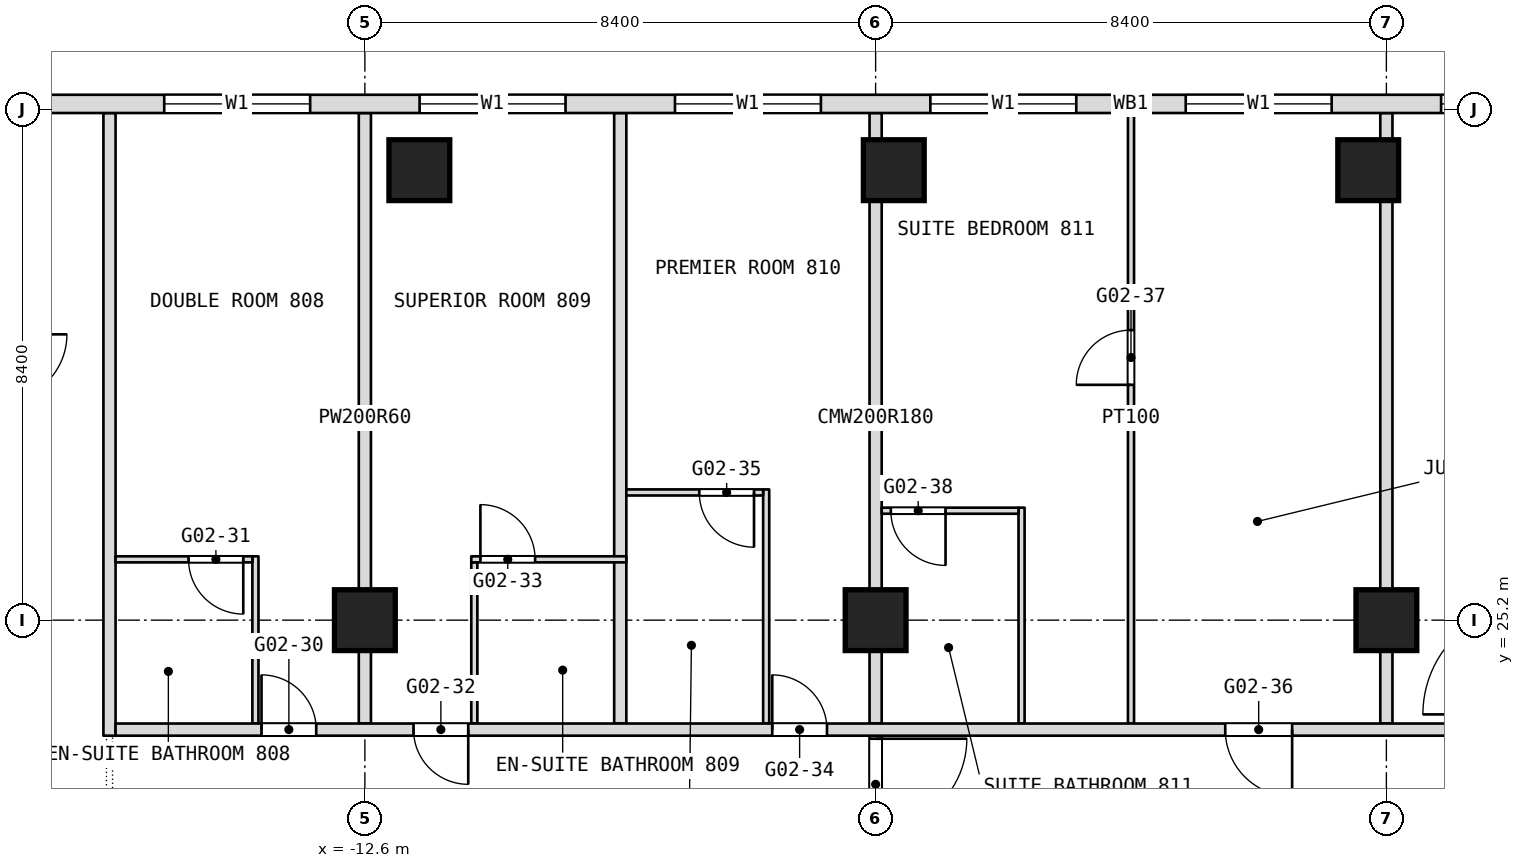
"""IFC4 building model, lengths in metres.
Left out: names, types, materials, properties, quantities, classifications, styles, units other than length and angle.
Written with IfcOpenShell. Run it as: python <this file> out.ifc"""

import sys

from ifc_helpers import new_model, si_unit, direction, frame, frame_2d, origin, origin_2d, place, context, subcontext, project, spatial, rectangle, extrude, element, fill, save


model = new_model("IFC4")
c1 = context("Model", 3, precision=1e-05, world=origin(), true_north=direction((0.0, 1.0)))
c2 = subcontext(c1, "Body", "Model", "MODEL_VIEW")
j1 = project(units=[si_unit("LENGTHUNIT", "METRE"), si_unit("PLANEANGLEUNIT", "RADIAN")], contexts=[c1])
p1 = place(None, origin())
s1 = spatial("IfcSite", under=j1, at=p1, CompositionType="ELEMENT")
p2 = place(p1, origin())
s2 = spatial("IfcBuilding", under=s1, at=p2, CompositionType="ELEMENT")
p3 = place(p2, frame((0.0, 0.0, 43.7)))
s3 = spatial("IfcBuildingStorey", under=s2, at=p3, CompositionType="ELEMENT", Elevation=43.7)
for number, where, z_axis, x_axis in (
    (1, (-12.6, 25.2, 0.0), (0.0, 0.0, 1.0), (1.0, 0.0, 0.0)),
    (2, (-4.2, 25.2, 0.0), (0.0, 0.0, 1.0), (1.0, 0.0, 0.0)),
    (3, (4.2, 25.2, 0.0), (0.0, 0.0, 1.0), (1.0, 0.0, 0.0)),
    (4, (-11.704, 32.6, 0.0), (0.0, 0.0, 1.0), (1.0, 0.0, 0.0)),
    (5, (-3.901, 32.6, 0.0), (0.0, 0.0, 1.0), (1.0, 0.0, 0.0)),
    (6, (3.901, 32.6, 0.0), (0.0, 0.0, 1.0), (1.0, 0.0, 0.0)),
):
    element("IfcColumn", number, at=place(p3, frame(where, z_axis=z_axis, x_axis=x_axis)), inside=s3, PredefinedType="COLUMN", context=c2, shape_type="SweptSolid", body=[
        extrude(rectangle(XDim=1.0, YDim=1.0, at=origin_2d()), origin(), (0.0, 0.0, 1.0), 3.6),
    ])
p4 = place(p3, frame((4.2, 23.5, 0.0), z_axis=(0.0, 0.0, 1.0), x_axis=(0.0, 1.0, 0.0)))
e7 = element("IfcWall", 7, at=p4, inside=s3, PredefinedType="PARTITIONING", context=c2, shape_type="SweptSolid", body=[
    extrude(rectangle(XDim=10.04, YDim=0.2, at=frame_2d((5.02, 0.0))), origin(), (0.0, 0.0, 1.0), 3.34),
])
p5 = place(p3, frame((0.0, 23.5, 0.0), z_axis=(0.0, 0.0, 1.0), x_axis=(0.0, 1.0, 0.0)))
e8 = element("IfcWall", 8, at=p5, inside=s3, PredefinedType="PARTITIONING", context=c2, shape_type="SweptSolid", body=[
    extrude(rectangle(XDim=10.04, YDim=0.1, at=frame_2d((5.02, 0.0))), origin(), (0.0, 0.0, 1.0), 3.34),
])
p6 = place(p5, frame((5.57, 0.0, 0.0)))
e9 = element("IfcOpeningElement", 9, at=p6, cuts=e8, PredefinedType="OPENING", context=c2, shape_type="SweptSolid", body=[
    extrude(rectangle(XDim=0.9, YDim=2.1, at=frame_2d((0.45, 1.05))), frame((0.0, 0.05, 0.0), z_axis=(0.0, -1.0, 0.0), x_axis=(1.0, 0.0, 0.0)), (0.0, 0.0, 1.0), 0.1),
])
p7 = place(p3, frame((-1.8, 23.5, 0.0), z_axis=(0.0, 0.0, 1.0), x_axis=(0.0, 1.0, 0.0)))
e10 = element("IfcWall", 10, at=p7, inside=s3, PredefinedType="PARTITIONING", context=c2, shape_type="SweptSolid", body=[
    extrude(rectangle(XDim=3.55, YDim=0.1, at=frame_2d((1.775, 0.0))), origin(), (0.0, 0.0, 1.0), 3.34),
])
p8 = place(p3, frame((-4.2, 16.8, 0.0), z_axis=(0.0, 0.0, 1.0), x_axis=(0.0, 1.0, 0.0)))
e11 = element("IfcWall", 11, at=p8, inside=s3, PredefinedType="PARTITIONING", context=c2, shape_type="SweptSolid", body=[
    extrude(rectangle(XDim=6.7, YDim=0.2, at=frame_2d((3.35, 0.0))), origin(), (0.0, 0.0, 1.0), 3.34),
])
p9 = place(p8, frame((0.15, 0.0, 0.0)))
e12 = element("IfcOpeningElement", 12, at=p9, cuts=e11, PredefinedType="OPENING", context=c2, shape_type="SweptSolid", body=[
    extrude(rectangle(XDim=1.5, YDim=2.1, at=frame_2d((0.75, 1.05))), frame((0.0, 0.1, 0.0), z_axis=(0.0, -1.0, 0.0), x_axis=(1.0, 0.0, 0.0)), (0.0, 0.0, 1.0), 0.2),
])
p10 = place(p8, frame((4.95, 0.0, 0.0)))
e13 = element("IfcOpeningElement", 13, at=p10, cuts=e11, PredefinedType="OPENING", context=c2, shape_type="SweptSolid", body=[
    extrude(rectangle(XDim=1.5, YDim=2.1, at=frame_2d((0.75, 1.05))), frame((0.0, 0.1, 0.0), z_axis=(0.0, -1.0, 0.0), x_axis=(1.0, 0.0, 0.0)), (0.0, 0.0, 1.0), 0.2),
])
p11 = place(p3, frame((-4.2, 23.5, 0.0), z_axis=(0.0, 0.0, 1.0), x_axis=(0.0, 1.0, 0.0)))
e14 = element("IfcWall", 14, at=p11, inside=s3, PredefinedType="PARTITIONING", context=c2, shape_type="SweptSolid", body=[
    extrude(rectangle(XDim=10.04, YDim=0.2, at=frame_2d((5.02, 0.0))), origin(), (0.0, 0.0, 1.0), 3.34),
])
p12 = place(p3, frame((-6.0, 23.5, 0.0), z_axis=(0.0, 0.0, 1.0), x_axis=(0.0, 1.0, 0.0)))
e15 = element("IfcWall", 15, at=p12, inside=s3, PredefinedType="PARTITIONING", context=c2, shape_type="SweptSolid", body=[
    extrude(rectangle(XDim=3.85, YDim=0.1, at=frame_2d((1.925, 0.0))), origin(), (0.0, 0.0, 1.0), 3.34),
])
p13 = place(p3, frame((-8.4, 23.5, 0.0), z_axis=(0.0, 0.0, 1.0), x_axis=(0.0, 1.0, 0.0)))
e16 = element("IfcWall", 16, at=p13, inside=s3, PredefinedType="PARTITIONING", context=c2, shape_type="SweptSolid", body=[
    extrude(rectangle(XDim=10.04, YDim=0.2, at=frame_2d((5.02, 0.0))), origin(), (0.0, 0.0, 1.0), 3.34),
])
p14 = place(p3, frame((-10.8, 23.5, 0.0), z_axis=(0.0, 0.0, 1.0), x_axis=(0.0, 1.0, 0.0)))
e17 = element("IfcWall", 17, at=p14, inside=s3, PredefinedType="PARTITIONING", context=c2, shape_type="SweptSolid", body=[
    extrude(rectangle(XDim=2.65, YDim=0.1, at=frame_2d((1.325, 0.0))), origin(), (0.0, 0.0, 1.0), 3.34),
])
p15 = place(p3, frame((-12.6, 23.5, 0.0), z_axis=(0.0, 0.0, 1.0), x_axis=(0.0, 1.0, 0.0)))
e18 = element("IfcWall", 18, at=p15, inside=s3, PredefinedType="PARTITIONING", context=c2, shape_type="SweptSolid", body=[
    extrude(rectangle(XDim=10.04, YDim=0.2, at=frame_2d((5.02, 0.0))), origin(), (0.0, 0.0, 1.0), 3.34),
])
p16 = place(p3, frame((-14.4, 23.5, 0.0), z_axis=(0.0, 0.0, 1.0), x_axis=(0.0, 1.0, 0.0)))
e19 = element("IfcWall", 19, at=p16, inside=s3, PredefinedType="PARTITIONING", context=c2, shape_type="SweptSolid", body=[
    extrude(rectangle(XDim=2.75, YDim=0.1, at=frame_2d((1.375, 0.0))), origin(), (0.0, 0.0, 1.0), 3.34),
])
p17 = place(p3, frame((-16.8, 23.3, 0.0), z_axis=(0.0, 0.0, 1.0), x_axis=(0.0, 1.0, 0.0)))
e20 = element("IfcWall", 20, at=p17, inside=s3, PredefinedType="PARTITIONING", context=c2, shape_type="SweptSolid", body=[
    extrude(rectangle(XDim=10.24, YDim=0.2, at=frame_2d((5.12, 0.0))), origin(), (0.0, 0.0, 1.0), 3.34),
])
p18 = place(p3, frame((-16.7, 23.4, 0.0), z_axis=(0.0, 0.0, 1.0), x_axis=(1.0, 0.0, 0.0)))
e21 = element("IfcWall", 21, at=p18, inside=s3, PredefinedType="PARTITIONING", context=c2, shape_type="SweptSolid", body=[
    extrude(rectangle(XDim=23.4, YDim=0.2, at=frame_2d((11.7, 0.0))), origin(), (0.0, 0.0, 1.0), 3.34),
])
p19 = place(p18, frame((2.4, 0.0, 0.0)))
e22 = element("IfcOpeningElement", 22, at=p19, cuts=e21, PredefinedType="OPENING", context=c2, shape_type="SweptSolid", body=[
    extrude(rectangle(XDim=0.9, YDim=2.1, at=frame_2d((0.45, 1.05))), frame((0.0, 0.1, 0.0), z_axis=(0.0, -1.0, 0.0), x_axis=(1.0, 0.0, 0.0)), (0.0, 0.0, 1.0), 0.2),
])
p20 = place(p18, frame((4.9, 0.0, 0.0)))
e23 = element("IfcOpeningElement", 23, at=p20, cuts=e21, PredefinedType="OPENING", context=c2, shape_type="SweptSolid", body=[
    extrude(rectangle(XDim=0.9, YDim=2.1, at=frame_2d((0.45, 1.05))), frame((0.0, 0.1, 0.0), z_axis=(0.0, -1.0, 0.0), x_axis=(1.0, 0.0, 0.0)), (0.0, 0.0, 1.0), 0.2),
])
p21 = place(p18, frame((10.8, 0.0, 0.0)))
e24 = element("IfcOpeningElement", 24, at=p21, cuts=e21, PredefinedType="OPENING", context=c2, shape_type="SweptSolid", body=[
    extrude(rectangle(XDim=0.9, YDim=2.1, at=frame_2d((0.45, 1.05))), frame((0.0, 0.1, 0.0), z_axis=(0.0, -1.0, 0.0), x_axis=(1.0, 0.0, 0.0)), (0.0, 0.0, 1.0), 0.2),
])
p22 = place(p18, frame((18.25, 0.0, 0.0)))
e25 = element("IfcOpeningElement", 25, at=p22, cuts=e21, PredefinedType="OPENING", context=c2, shape_type="SweptSolid", body=[
    extrude(rectangle(XDim=1.1, YDim=2.1, at=frame_2d((0.55, 1.05))), frame((0.0, 0.1, 0.0), z_axis=(0.0, -1.0, 0.0), x_axis=(1.0, 0.0, 0.0)), (0.0, 0.0, 1.0), 0.2),
])
p23 = place(p3, frame((-16.7, 26.2, 0.0), z_axis=(0.0, 0.0, 1.0), x_axis=(1.0, 0.0, 0.0)))
e26 = element("IfcWall", 26, at=p23, inside=s3, PredefinedType="PARTITIONING", context=c2, shape_type="SweptSolid", body=[
    extrude(rectangle(XDim=2.25, YDim=0.1, at=frame_2d((1.125, 0.0))), origin(), (0.0, 0.0, 1.0), 3.34),
])
p24 = place(p23, frame((1.2, 0.0, 0.0)))
e27 = element("IfcOpeningElement", 27, at=p24, cuts=e26, PredefinedType="OPENING", context=c2, shape_type="SweptSolid", body=[
    extrude(rectangle(XDim=0.9, YDim=2.1, at=frame_2d((0.45, 1.05))), frame((0.0, 0.05, 0.0), z_axis=(0.0, -1.0, 0.0), x_axis=(1.0, 0.0, 0.0)), (0.0, 0.0, 1.0), 0.1),
])
p25 = place(p3, frame((-10.85, 26.2, 0.0), z_axis=(0.0, 0.0, 1.0), x_axis=(1.0, 0.0, 0.0)))
e28 = element("IfcWall", 28, at=p25, inside=s3, PredefinedType="PARTITIONING", context=c2, shape_type="SweptSolid", body=[
    extrude(rectangle(XDim=2.55, YDim=0.1, at=frame_2d((1.275, 0.0))), origin(), (0.0, 0.0, 1.0), 3.34),
])
p26 = place(p25, frame((0.15, 0.0, 0.0)))
e29 = element("IfcOpeningElement", 29, at=p26, cuts=e28, PredefinedType="OPENING", context=c2, shape_type="SweptSolid", body=[
    extrude(rectangle(XDim=0.9, YDim=2.1, at=frame_2d((0.45, 1.05))), frame((0.0, 0.05, 0.0), z_axis=(0.0, -1.0, 0.0), x_axis=(1.0, 0.0, 0.0)), (0.0, 0.0, 1.0), 0.1),
])
p27 = place(p3, frame((-4.1, 27.0, 0.0), z_axis=(0.0, 0.0, 1.0), x_axis=(1.0, 0.0, 0.0)))
e30 = element("IfcWall", 30, at=p27, inside=s3, PredefinedType="PARTITIONING", context=c2, shape_type="SweptSolid", body=[
    extrude(rectangle(XDim=2.25, YDim=0.1, at=frame_2d((1.125, 0.0))), origin(), (0.0, 0.0, 1.0), 3.34),
])
p28 = place(p27, frame((0.15, 0.0, 0.0)))
e31 = element("IfcOpeningElement", 31, at=p28, cuts=e30, PredefinedType="OPENING", context=c2, shape_type="SweptSolid", body=[
    extrude(rectangle(XDim=0.9, YDim=2.1, at=frame_2d((0.45, 1.05))), frame((0.0, 0.05, 0.0), z_axis=(0.0, -1.0, 0.0), x_axis=(1.0, 0.0, 0.0)), (0.0, 0.0, 1.0), 0.1),
])
p29 = place(p3, frame((-8.3, 27.3, 0.0), z_axis=(0.0, 0.0, 1.0), x_axis=(1.0, 0.0, 0.0)))
e32 = element("IfcWall", 32, at=p29, inside=s3, PredefinedType="PARTITIONING", context=c2, shape_type="SweptSolid", body=[
    extrude(rectangle(XDim=2.25, YDim=0.1, at=frame_2d((1.125, 0.0))), origin(), (0.0, 0.0, 1.0), 3.34),
])
p30 = place(p29, frame((1.2, 0.0, 0.0)))
e33 = element("IfcOpeningElement", 33, at=p30, cuts=e32, PredefinedType="OPENING", context=c2, shape_type="SweptSolid", body=[
    extrude(rectangle(XDim=0.9, YDim=2.1, at=frame_2d((0.45, 1.05))), frame((0.0, 0.05, 0.0), z_axis=(0.0, -1.0, 0.0), x_axis=(1.0, 0.0, 0.0)), (0.0, 0.0, 1.0), 0.1),
])
p31 = place(p3, frame((23.406, 33.69, 0.0), z_axis=(0.0, 0.0, 1.0), x_axis=(-1.0, 0.0, 0.0)))
e34 = element("IfcWall", 34, at=p31, inside=s3, PredefinedType="NOTDEFINED", context=c2, shape_type="SweptSolid", body=[
    extrude(rectangle(XDim=46.812, YDim=0.3, at=frame_2d((23.406, 0.0))), origin(), (0.0, 0.0, 1.0), 3.6),
])
p32 = place(p31, frame((2.186, 0.0, 0.9)))
e35 = element("IfcOpeningElement", 35, at=p32, cuts=e34, PredefinedType="OPENING", context=c2, shape_type="SweptSolid", body=[
    extrude(rectangle(XDim=2.4, YDim=2.1, at=frame_2d((1.2, 1.05))), frame((0.0, 0.15, 0.0), z_axis=(0.0, -1.0, 0.0), x_axis=(1.0, 0.0, 0.0)), (0.0, 0.0, 1.0), 0.3),
])
p33 = place(p31, frame((7.506, 0.0, 0.9)))
e36 = element("IfcOpeningElement", 36, at=p33, cuts=e34, PredefinedType="OPENING", context=c2, shape_type="SweptSolid", body=[
    extrude(rectangle(XDim=2.4, YDim=2.1, at=frame_2d((1.2, 1.05))), frame((0.0, 0.15, 0.0), z_axis=(0.0, -1.0, 0.0), x_axis=(1.0, 0.0, 0.0)), (0.0, 0.0, 1.0), 0.3),
])
p34 = place(p31, frame((11.706, 0.0, 0.9)))
e37 = element("IfcOpeningElement", 37, at=p34, cuts=e34, PredefinedType="OPENING", context=c2, shape_type="SweptSolid", body=[
    extrude(rectangle(XDim=2.4, YDim=2.1, at=frame_2d((1.2, 1.05))), frame((0.0, 0.15, 0.0), z_axis=(0.0, -1.0, 0.0), x_axis=(1.0, 0.0, 0.0)), (0.0, 0.0, 1.0), 0.3),
])
p35 = place(p31, frame((15.906, 0.0, 0.9)))
e38 = element("IfcOpeningElement", 38, at=p35, cuts=e34, PredefinedType="OPENING", context=c2, shape_type="SweptSolid", body=[
    extrude(rectangle(XDim=2.4, YDim=2.1, at=frame_2d((1.2, 1.05))), frame((0.0, 0.15, 0.0), z_axis=(0.0, -1.0, 0.0), x_axis=(1.0, 0.0, 0.0)), (0.0, 0.0, 1.0), 0.3),
])
p36 = place(p31, frame((20.106, 0.0, 0.9)))
e39 = element("IfcOpeningElement", 39, at=p36, cuts=e34, PredefinedType="OPENING", context=c2, shape_type="SweptSolid", body=[
    extrude(rectangle(XDim=2.4, YDim=2.1, at=frame_2d((1.2, 1.05))), frame((0.0, 0.15, 0.0), z_axis=(0.0, -1.0, 0.0), x_axis=(1.0, 0.0, 0.0)), (0.0, 0.0, 1.0), 0.3),
])
p37 = place(p31, frame((24.306, 0.0, 0.9)))
e40 = element("IfcOpeningElement", 40, at=p37, cuts=e34, PredefinedType="OPENING", context=c2, shape_type="SweptSolid", body=[
    extrude(rectangle(XDim=2.4, YDim=2.1, at=frame_2d((1.2, 1.05))), frame((0.0, 0.15, 0.0), z_axis=(0.0, -1.0, 0.0), x_axis=(1.0, 0.0, 0.0)), (0.0, 0.0, 1.0), 0.3),
])
p38 = place(p31, frame((28.506, 0.0, 0.9)))
e41 = element("IfcOpeningElement", 41, at=p38, cuts=e34, PredefinedType="OPENING", context=c2, shape_type="SweptSolid", body=[
    extrude(rectangle(XDim=2.4, YDim=2.1, at=frame_2d((1.2, 1.05))), frame((0.0, 0.15, 0.0), z_axis=(0.0, -1.0, 0.0), x_axis=(1.0, 0.0, 0.0)), (0.0, 0.0, 1.0), 0.3),
])
p39 = place(p31, frame((32.706, 0.0, 0.9)))
e42 = element("IfcOpeningElement", 42, at=p39, cuts=e34, PredefinedType="OPENING", context=c2, shape_type="SweptSolid", body=[
    extrude(rectangle(XDim=2.4, YDim=2.1, at=frame_2d((1.2, 1.05))), frame((0.0, 0.15, 0.0), z_axis=(0.0, -1.0, 0.0), x_axis=(1.0, 0.0, 0.0)), (0.0, 0.0, 1.0), 0.3),
])
p40 = place(p31, frame((36.906, 0.0, 0.9)))
e43 = element("IfcOpeningElement", 43, at=p40, cuts=e34, PredefinedType="OPENING", context=c2, shape_type="SweptSolid", body=[
    extrude(rectangle(XDim=2.4, YDim=2.1, at=frame_2d((1.2, 1.05))), frame((0.0, 0.15, 0.0), z_axis=(0.0, -1.0, 0.0), x_axis=(1.0, 0.0, 0.0)), (0.0, 0.0, 1.0), 0.3),
])
p41 = place(p31, frame((42.226, 0.0, 0.9)))
e44 = element("IfcOpeningElement", 44, at=p41, cuts=e34, PredefinedType="OPENING", context=c2, shape_type="SweptSolid", body=[
    extrude(rectangle(XDim=2.4, YDim=2.1, at=frame_2d((1.2, 1.05))), frame((0.0, 0.15, 0.0), z_axis=(0.0, -1.0, 0.0), x_axis=(1.0, 0.0, 0.0)), (0.0, 0.0, 1.0), 0.3),
])
p42 = place(p6, origin())
e45 = element("IfcDoor", 45, at=p42, inside=s3, OperationType="SINGLE_SWING_LEFT", PredefinedType="DOOR", context=c2, shape_type="SweptSolid", body=[
    extrude(rectangle(XDim=0.9, YDim=2.1, at=frame_2d((0.45, 1.05))), frame((0.0, 0.025, 0.0), z_axis=(0.0, -1.0, 0.0), x_axis=(1.0, 0.0, 0.0)), (0.0, 0.0, 1.0), 0.05),
])
fill(e9, e45)
p43 = place(p19, origin())
e46 = element("IfcDoor", 46, at=p43, inside=s3, OperationType="SINGLE_SWING_LEFT", PredefinedType="DOOR", context=c2, shape_type="SweptSolid", body=[
    extrude(rectangle(XDim=0.9, YDim=2.1, at=frame_2d((0.45, 1.05))), frame((0.0, 0.025, 0.0), z_axis=(0.0, -1.0, 0.0), x_axis=(1.0, 0.0, 0.0)), (0.0, 0.0, 1.0), 0.05),
])
fill(e22, e46)
p44 = place(p20, origin())
e47 = element("IfcDoor", 47, at=p44, inside=s3, OperationType="SINGLE_SWING_RIGHT", PredefinedType="DOOR", context=c2, shape_type="SweptSolid", body=[
    extrude(rectangle(XDim=0.9, YDim=2.1, at=frame_2d((0.45, 1.05))), frame((0.0, 0.025, 0.0), z_axis=(0.0, -1.0, 0.0), x_axis=(1.0, 0.0, 0.0)), (0.0, 0.0, 1.0), 0.05),
])
fill(e23, e47)
p45 = place(p21, origin())
e48 = element("IfcDoor", 48, at=p45, inside=s3, OperationType="SINGLE_SWING_LEFT", PredefinedType="DOOR", context=c2, shape_type="SweptSolid", body=[
    extrude(rectangle(XDim=0.9, YDim=2.1, at=frame_2d((0.45, 1.05))), frame((0.0, 0.025, 0.0), z_axis=(0.0, -1.0, 0.0), x_axis=(1.0, 0.0, 0.0)), (0.0, 0.0, 1.0), 0.05),
])
fill(e24, e48)
p46 = place(p22, origin())
e49 = element("IfcDoor", 49, at=p46, inside=s3, OperationType="SINGLE_SWING_LEFT", PredefinedType="DOOR", context=c2, shape_type="SweptSolid", body=[
    extrude(rectangle(XDim=1.1, YDim=2.1, at=frame_2d((0.55, 1.05))), frame((0.0, 0.025, 0.0), z_axis=(0.0, -1.0, 0.0), x_axis=(1.0, 0.0, 0.0)), (0.0, 0.0, 1.0), 0.05),
])
fill(e25, e49)
p47 = place(p24, origin())
e50 = element("IfcDoor", 50, at=p47, inside=s3, OperationType="SINGLE_SWING_LEFT", PredefinedType="DOOR", context=c2, shape_type="SweptSolid", body=[
    extrude(rectangle(XDim=0.9, YDim=2.1, at=frame_2d((0.45, 1.05))), frame((0.0, 0.025, 0.0), z_axis=(0.0, -1.0, 0.0), x_axis=(1.0, 0.0, 0.0)), (0.0, 0.0, 1.0), 0.05),
])
fill(e27, e50)
p48 = place(p26, origin())
e51 = element("IfcDoor", 51, at=p48, inside=s3, OperationType="SINGLE_SWING_RIGHT", PredefinedType="DOOR", context=c2, shape_type="SweptSolid", body=[
    extrude(rectangle(XDim=0.9, YDim=2.1, at=frame_2d((0.45, 1.05))), frame((0.0, 0.025, 0.0), z_axis=(0.0, -1.0, 0.0), x_axis=(1.0, 0.0, 0.0)), (0.0, 0.0, 1.0), 0.05),
])
fill(e29, e51)
p49 = place(p28, origin())
e52 = element("IfcDoor", 52, at=p49, inside=s3, OperationType="SINGLE_SWING_RIGHT", PredefinedType="DOOR", context=c2, shape_type="SweptSolid", body=[
    extrude(rectangle(XDim=0.9, YDim=2.1, at=frame_2d((0.45, 1.05))), frame((0.0, 0.025, 0.0), z_axis=(0.0, -1.0, 0.0), x_axis=(1.0, 0.0, 0.0)), (0.0, 0.0, 1.0), 0.05),
])
fill(e31, e52)
p50 = place(p30, origin())
e53 = element("IfcDoor", 53, at=p50, inside=s3, OperationType="SINGLE_SWING_LEFT", PredefinedType="DOOR", context=c2, shape_type="SweptSolid", body=[
    extrude(rectangle(XDim=0.9, YDim=2.1, at=frame_2d((0.45, 1.05))), frame((0.0, 0.025, 0.0), z_axis=(0.0, -1.0, 0.0), x_axis=(1.0, 0.0, 0.0)), (0.0, 0.0, 1.0), 0.05),
])
fill(e33, e53)
p51 = place(p35, origin())
e54 = element("IfcWindow", 54, at=p51, inside=s3, PartitioningType="SINGLE_PANEL", PredefinedType="WINDOW", context=c2, shape_type="SweptSolid", body=[
    extrude(rectangle(XDim=2.4, YDim=2.1, at=frame_2d((1.2, 1.05))), frame((0.0, 0.03, 0.0), z_axis=(0.0, -1.0, 0.0), x_axis=(1.0, 0.0, 0.0)), (0.0, 0.0, 1.0), 0.06),
])
fill(e38, e54)
p52 = place(p36, origin())
e55 = element("IfcWindow", 55, at=p52, inside=s3, PartitioningType="SINGLE_PANEL", PredefinedType="WINDOW", context=c2, shape_type="SweptSolid", body=[
    extrude(rectangle(XDim=2.4, YDim=2.1, at=frame_2d((1.2, 1.05))), frame((0.0, 0.03, 0.0), z_axis=(0.0, -1.0, 0.0), x_axis=(1.0, 0.0, 0.0)), (0.0, 0.0, 1.0), 0.06),
])
fill(e39, e55)
p53 = place(p37, origin())
e56 = element("IfcWindow", 56, at=p53, inside=s3, PartitioningType="SINGLE_PANEL", PredefinedType="WINDOW", context=c2, shape_type="SweptSolid", body=[
    extrude(rectangle(XDim=2.4, YDim=2.1, at=frame_2d((1.2, 1.05))), frame((0.0, 0.03, 0.0), z_axis=(0.0, -1.0, 0.0), x_axis=(1.0, 0.0, 0.0)), (0.0, 0.0, 1.0), 0.06),
])
fill(e40, e56)
p54 = place(p38, origin())
e57 = element("IfcWindow", 57, at=p54, inside=s3, PartitioningType="SINGLE_PANEL", PredefinedType="WINDOW", context=c2, shape_type="SweptSolid", body=[
    extrude(rectangle(XDim=2.4, YDim=2.1, at=frame_2d((1.2, 1.05))), frame((0.0, 0.03, 0.0), z_axis=(0.0, -1.0, 0.0), x_axis=(1.0, 0.0, 0.0)), (0.0, 0.0, 1.0), 0.06),
])
fill(e41, e57)
p55 = place(p39, origin())
e58 = element("IfcWindow", 58, at=p55, inside=s3, PartitioningType="SINGLE_PANEL", PredefinedType="WINDOW", context=c2, shape_type="SweptSolid", body=[
    extrude(rectangle(XDim=2.4, YDim=2.1, at=frame_2d((1.2, 1.05))), frame((0.0, 0.03, 0.0), z_axis=(0.0, -1.0, 0.0), x_axis=(1.0, 0.0, 0.0)), (0.0, 0.0, 1.0), 0.06),
])
fill(e42, e58)
p56 = place(p40, origin())
e59 = element("IfcWindow", 59, at=p56, inside=s3, PartitioningType="SINGLE_PANEL", PredefinedType="WINDOW", context=c2, shape_type="SweptSolid", body=[
    extrude(rectangle(XDim=2.4, YDim=2.1, at=frame_2d((1.2, 1.05))), frame((0.0, 0.03, 0.0), z_axis=(0.0, -1.0, 0.0), x_axis=(1.0, 0.0, 0.0)), (0.0, 0.0, 1.0), 0.06),
])
fill(e43, e59)
p57 = place(p10, origin())
e60 = element("IfcDoor", 60, at=p57, inside=s3, OperationType="DOUBLE_DOOR_DOUBLE_SWING", PredefinedType="DOOR", context=c2, shape_type="SweptSolid", body=[
    extrude(rectangle(XDim=1.5, YDim=2.1, at=frame_2d((0.75, 1.05))), frame((0.0, 0.025, 0.0), z_axis=(0.0, -1.0, 0.0), x_axis=(1.0, 0.0, 0.0)), (0.0, 0.0, 1.0), 0.05),
])
fill(e13, e60)
save(model, sys.argv[1])
